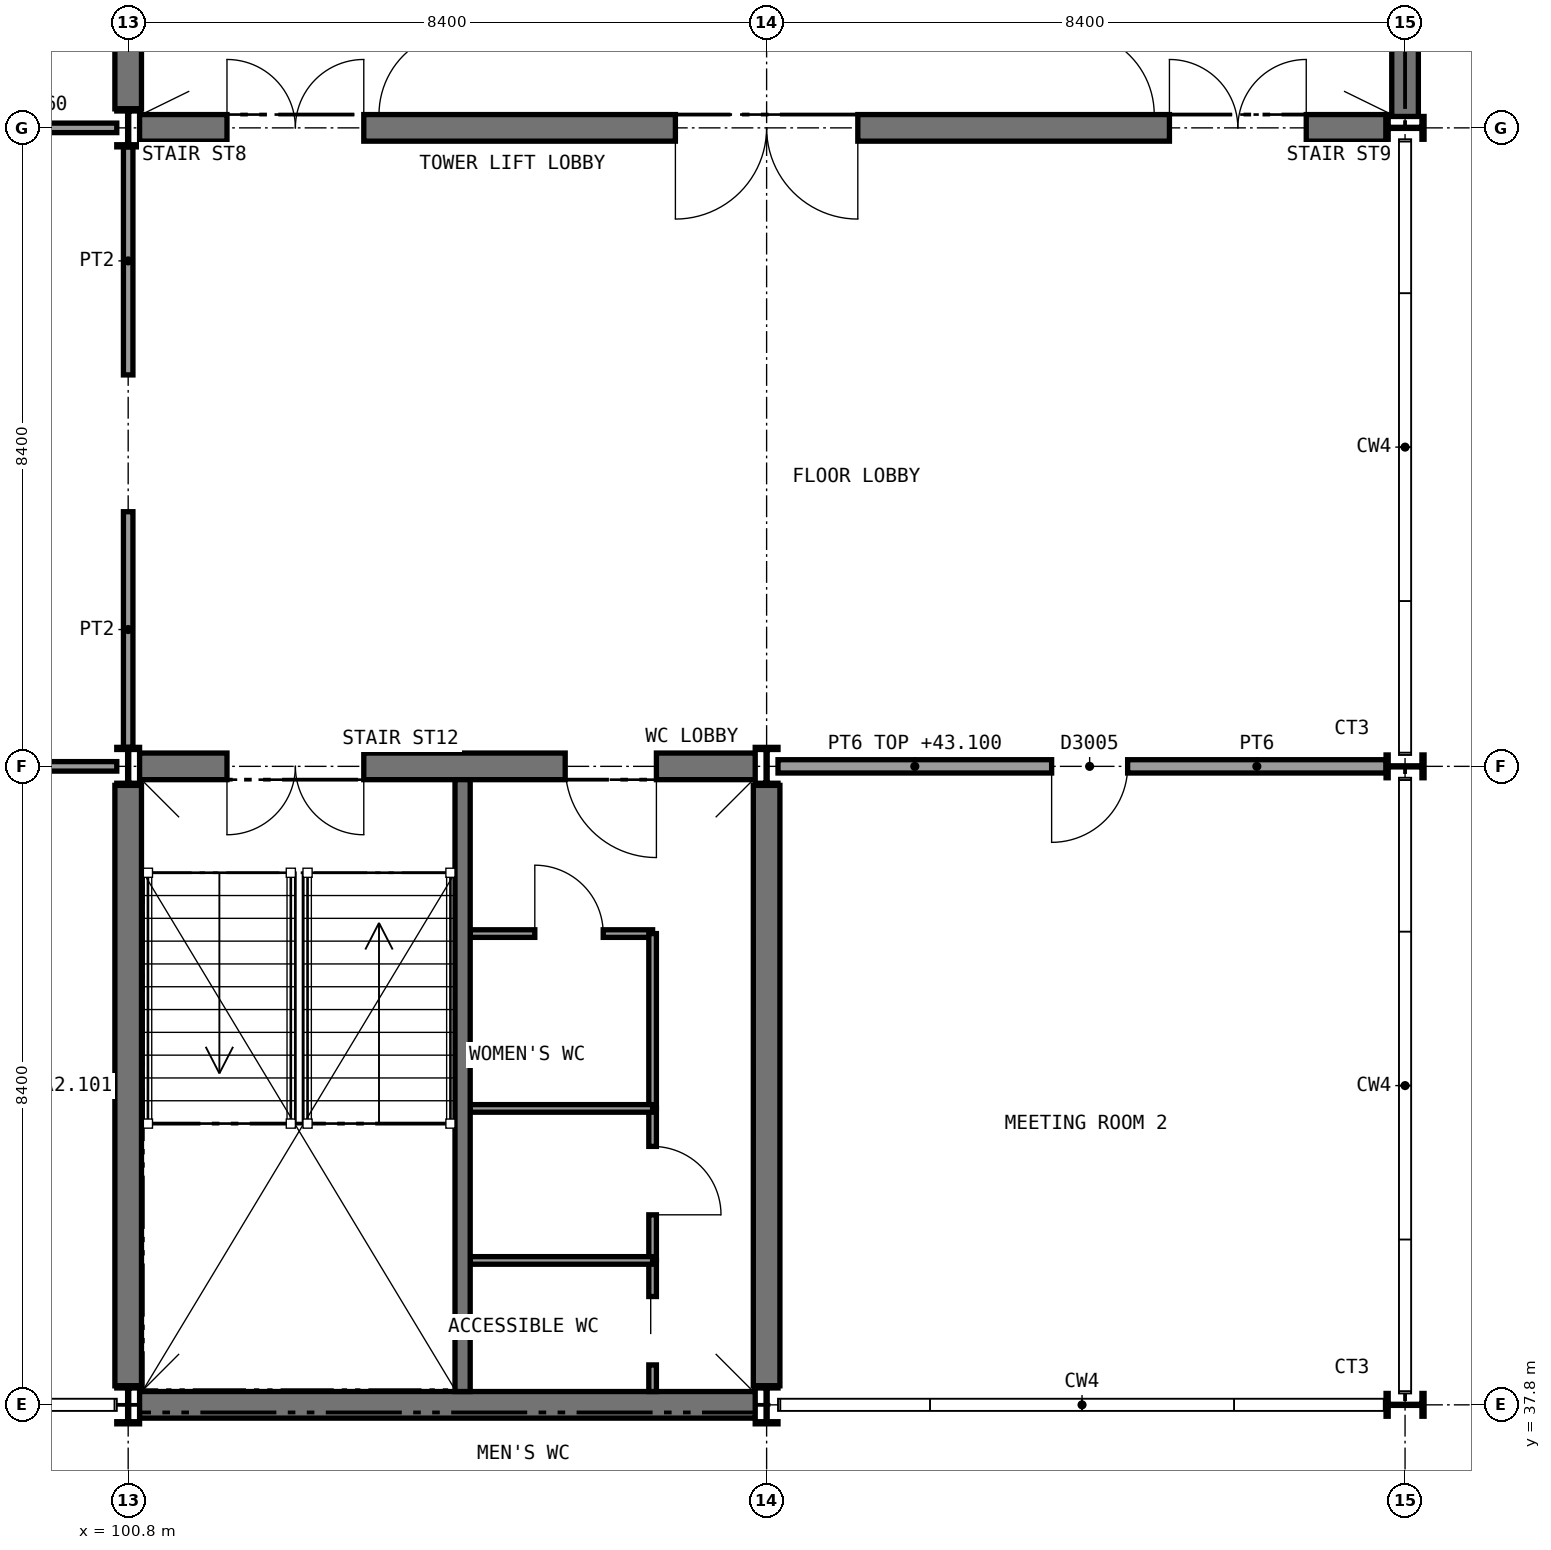
"""IFC4 building model, lengths in metres.
Left out: names, types, materials, properties, quantities, classifications, styles, units other than length and angle.
Written with IfcOpenShell. Run it as: python <this file> out.ifc"""

import sys

from ifc_helpers import new_model, si_unit, direction, frame, frame_2d, origin, origin_2d, place, context, subcontext, project, spatial, rectangle, i_section, extrude, element, fill, save


model = new_model("IFC4")
c1 = context("Model", 3, precision=1e-05, world=origin(), true_north=direction((0.0, 1.0)))
c2 = subcontext(c1, "Body", "Model", "MODEL_VIEW")
j1 = project(units=[si_unit("LENGTHUNIT", "METRE"), si_unit("PLANEANGLEUNIT", "RADIAN")], contexts=[c1])
p1 = place(None, origin())
s1 = spatial("IfcSite", under=j1, at=p1, CompositionType="ELEMENT")
p2 = place(p1, origin())
s2 = spatial("IfcBuilding", under=s1, at=p2, CompositionType="ELEMENT")
p3 = place(p2, frame((0.0, 0.0, 39.6)))
s3 = spatial("IfcBuildingStorey", under=s2, at=p3, CompositionType="ELEMENT", Elevation=39.6)
p4 = place(p3, frame((100.95, 54.6, 0.0), z_axis=(0.0, 0.0, 1.0), x_axis=(1.0, 0.0, 0.0)))
e1 = element("IfcWall", 1, at=p4, inside=s3, PredefinedType="SHEAR", context=c2, shape_type="SweptSolid", body=[
    extrude(rectangle(XDim=16.4, YDim=0.35, at=frame_2d((8.2, 0.0))), origin(), (0.0, 0.0, 1.0), 3.85),
])
p5 = place(p4, frame((1.15, 0.0, 0.0)))
e2 = element("IfcOpeningElement", 2, at=p5, cuts=e1, PredefinedType="OPENING", context=c2, shape_type="SweptSolid", body=[
    extrude(rectangle(XDim=1.8, YDim=2.1, at=frame_2d((0.9, 1.05))), frame((0.0, 0.185, 0.0), z_axis=(0.0, -1.0, 0.0), x_axis=(1.0, 0.0, 0.0)), (0.0, 0.0, 1.0), 0.37),
])
p6 = place(p4, frame((13.55, 0.0, 0.0)))
e3 = element("IfcOpeningElement", 3, at=p6, cuts=e1, PredefinedType="OPENING", context=c2, shape_type="SweptSolid", body=[
    extrude(rectangle(XDim=1.8, YDim=2.1, at=frame_2d((0.9, 1.05))), frame((0.0, 0.185, 0.0), z_axis=(0.0, -1.0, 0.0), x_axis=(1.0, 0.0, 0.0)), (0.0, 0.0, 1.0), 0.37),
])
p7 = place(p4, frame((7.05, 0.0, 0.0)))
e4 = element("IfcOpeningElement", 4, at=p7, cuts=e1, PredefinedType="OPENING", context=c2, shape_type="SweptSolid", body=[
    extrude(rectangle(XDim=2.4, YDim=2.4, at=frame_2d((1.2, 1.2))), frame((0.0, 0.185, 0.0), z_axis=(0.0, -1.0, 0.0), x_axis=(1.0, 0.0, 0.0)), (0.0, 0.0, 1.0), 0.37),
])
p8 = place(p3, frame((100.8, 54.85, 0.0), z_axis=(0.0, 0.0, 1.0), x_axis=(0.0, 1.0, 0.0)))
e5 = element("IfcWall", 5, at=p8, inside=s3, PredefinedType="SHEAR", context=c2, shape_type="SweptSolid", body=[
    extrude(rectangle(XDim=7.9, YDim=0.35, at=frame_2d((3.95, 0.0))), origin(), (0.0, 0.0, 1.0), 3.85),
])
for number, where, z_axis, x_axis in (
    (6, (117.6, 54.75, 0.0), (0.0, 0.0, 1.0), (0.0, 1.0, 0.0)),
    (7, (100.95, 37.8, 0.0), (0.0, 0.0, 1.0), (1.0, 0.0, 0.0)),
):
    element("IfcWall", number, at=place(p3, frame(where, z_axis=z_axis, x_axis=x_axis)), inside=s3, PredefinedType="SHEAR", context=c2, shape_type="SweptSolid", body=[
        extrude(rectangle(XDim=8.1, YDim=0.35, at=frame_2d((4.05, 0.0))), origin(), (0.0, 0.0, 1.0), 3.85),
    ])
p9 = place(p3, frame((100.95, 46.2, 0.0), z_axis=(0.0, 0.0, 1.0), x_axis=(1.0, 0.0, 0.0)))
e8 = element("IfcWall", 8, at=p9, inside=s3, PredefinedType="SHEAR", context=c2, shape_type="SweptSolid", body=[
    extrude(rectangle(XDim=8.1, YDim=0.35, at=frame_2d((4.05, 0.0))), origin(), (0.0, 0.0, 1.0), 3.85),
])
p10 = place(p9, frame((1.15, 0.0, 0.0)))
e9 = element("IfcOpeningElement", 9, at=p10, cuts=e8, PredefinedType="OPENING", context=c2, shape_type="SweptSolid", body=[
    extrude(rectangle(XDim=1.8, YDim=2.1, at=frame_2d((0.9, 1.05))), frame((0.0, 0.185, 0.0), z_axis=(0.0, -1.0, 0.0), x_axis=(1.0, 0.0, 0.0)), (0.0, 0.0, 1.0), 0.37),
])
p11 = place(p9, frame((5.6, 0.0, 0.0)))
e10 = element("IfcOpeningElement", 10, at=p11, cuts=e8, PredefinedType="OPENING", context=c2, shape_type="SweptSolid", body=[
    extrude(rectangle(XDim=1.2, YDim=2.1, at=frame_2d((0.6, 1.05))), frame((0.0, 0.185, 0.0), z_axis=(0.0, -1.0, 0.0), x_axis=(1.0, 0.0, 0.0)), (0.0, 0.0, 1.0), 0.37),
])
for number, where, z_axis, x_axis in (
    (11, (100.8, 38.05, 0.0), (0.0, 0.0, 1.0), (0.0, 1.0, 0.0)),
    (12, (109.2, 38.05, 0.0), (0.0, 0.0, 1.0), (0.0, 1.0, 0.0)),
):
    element("IfcWall", number, at=place(p3, frame(where, z_axis=z_axis, x_axis=x_axis)), inside=s3, PredefinedType="SHEAR", context=c2, shape_type="SweptSolid", body=[
        extrude(rectangle(XDim=7.9, YDim=0.35, at=frame_2d((3.95, 0.0))), origin(), (0.0, 0.0, 1.0), 3.85),
    ])
for number, where, z_axis, x_axis in (
    (13, (100.8, 37.8, 0.0), (0.0, 0.0, 1.0), (1.0, 0.0, 0.0)),
    (14, (100.8, 46.2, 0.0), (0.0, 0.0, 1.0), (1.0, 0.0, 0.0)),
    (15, (100.8, 54.6, 0.0), (0.0, 0.0, 1.0), (1.0, 0.0, 0.0)),
    (16, (109.2, 37.8, 0.0), (0.0, 0.0, 1.0), (1.0, 0.0, 0.0)),
    (17, (109.2, 46.2, 0.0), (0.0, 0.0, 1.0), (1.0, 0.0, 0.0)),
    (18, (117.6, 37.8, 0.0), (0.0, 0.0, 1.0), (0.0, 1.0, 0.0)),
    (19, (117.6, 46.2, 0.0), (0.0, 0.0, 1.0), (0.0, 1.0, 0.0)),
    (20, (117.6, 54.6, 0.0), (0.0, 0.0, 1.0), (0.0, 1.0, 0.0)),
):
    element("IfcColumn", number, at=place(p3, frame(where, z_axis=z_axis, x_axis=x_axis)), inside=s3, PredefinedType="COLUMN", context=c2, shape_type="SweptSolid", body=[
        extrude(i_section(OverallWidth=0.3, OverallDepth=0.5, WebThickness=0.014, FlangeThickness=0.028, FilletRadius=0.027, at=origin_2d()), origin(), (0.0, 0.0, 1.0), 4.0),
    ])
p12 = place(p3, frame((105.3, 44.0, 0.0), z_axis=(0.0, 0.0, 1.0), x_axis=(1.0, 0.0, 0.0)))
e21 = element("IfcWall", 21, at=p12, inside=s3, PredefinedType="PARTITIONING", context=c2, shape_type="SweptSolid", body=[
    extrude(rectangle(XDim=2.4, YDim=0.1, at=frame_2d((1.2, 0.0))), origin(), (0.0, 0.0, 1.0), 3.78),
])
p13 = place(p12, frame((0.85, 0.0, 0.0)))
e22 = element("IfcOpeningElement", 22, at=p13, cuts=e21, PredefinedType="OPENING", context=c2, shape_type="SweptSolid", body=[
    extrude(rectangle(XDim=0.9, YDim=2.1, at=frame_2d((0.45, 1.05))), frame((0.0, 0.06, 0.0), z_axis=(0.0, -1.0, 0.0), x_axis=(1.0, 0.0, 0.0)), (0.0, 0.0, 1.0), 0.12),
])
p14 = place(p3, frame((107.7, 41.7, 0.0), z_axis=(0.0, 0.0, 1.0), x_axis=(0.0, 1.0, 0.0)))
e23 = element("IfcWall", 23, at=p14, inside=s3, PredefinedType="PARTITIONING", context=c2, shape_type="SweptSolid", body=[
    extrude(rectangle(XDim=2.3, YDim=0.1, at=frame_2d((1.15, 0.0))), origin(), (0.0, 0.0, 1.0), 3.78),
])
p15 = place(p3, frame((107.7, 39.7, 0.0), z_axis=(0.0, 0.0, 1.0), x_axis=(0.0, 1.0, 0.0)))
e24 = element("IfcWall", 24, at=p15, inside=s3, PredefinedType="PARTITIONING", context=c2, shape_type="SweptSolid", body=[
    extrude(rectangle(XDim=2.0, YDim=0.1, at=frame_2d((1.0, 0.0))), origin(), (0.0, 0.0, 1.0), 3.78),
])
p16 = place(p15, frame((0.6, 0.0, 0.0)))
e25 = element("IfcOpeningElement", 25, at=p16, cuts=e24, PredefinedType="OPENING", context=c2, shape_type="SweptSolid", body=[
    extrude(rectangle(XDim=0.9, YDim=2.1, at=frame_2d((0.45, 1.05))), frame((0.0, 0.06, 0.0), z_axis=(0.0, -1.0, 0.0), x_axis=(1.0, 0.0, 0.0)), (0.0, 0.0, 1.0), 0.12),
])
p17 = place(p3, frame((107.7, 37.975, 0.0), z_axis=(0.0, 0.0, 1.0), x_axis=(0.0, 1.0, 0.0)))
e26 = element("IfcWall", 26, at=p17, inside=s3, PredefinedType="PARTITIONING", context=c2, shape_type="SweptSolid", body=[
    extrude(rectangle(XDim=1.725, YDim=0.1, at=frame_2d((0.862, 0.0))), origin(), (0.0, 0.0, 1.0), 3.78),
])
p18 = place(p17, frame((0.35, 0.0, 0.0)))
e27 = element("IfcOpeningElement", 27, at=p18, cuts=e26, PredefinedType="OPENING", context=c2, shape_type="SweptSolid", body=[
    extrude(rectangle(XDim=0.9, YDim=2.1, at=frame_2d((0.45, 1.05))), frame((0.0, 0.06, 0.0), z_axis=(0.0, -1.0, 0.0), x_axis=(1.0, 0.0, 0.0)), (0.0, 0.0, 1.0), 0.12),
])
for number, where, z_axis, x_axis in (
    (28, (105.3, 41.7, 0.0), (0.0, 0.0, 1.0), (1.0, 0.0, 0.0)),
    (29, (105.3, 39.7, 0.0), (0.0, 0.0, 1.0), (1.0, 0.0, 0.0)),
):
    element("IfcWall", number, at=place(p3, frame(where, z_axis=z_axis, x_axis=x_axis)), inside=s3, PredefinedType="PARTITIONING", context=c2, shape_type="SweptSolid", body=[
        extrude(rectangle(XDim=2.4, YDim=0.1, at=frame_2d((1.2, 0.0))), origin(), (0.0, 0.0, 1.0), 3.78),
    ])
p19 = place(p3, frame((92.55, 46.2, 0.0), z_axis=(0.0, 0.0, 1.0), x_axis=(1.0, 0.0, 0.0)))
e30 = element("IfcWall", 30, at=p19, inside=s3, PredefinedType="PARTITIONING", context=c2, shape_type="SweptSolid", body=[
    extrude(rectangle(XDim=8.1, YDim=0.125, at=frame_2d((4.05, 0.0))), origin(), (0.0, 0.0, 1.0), 3.5),
])
p20 = place(p19, frame((3.1, 0.0, 0.0)))
e31 = element("IfcOpeningElement", 31, at=p20, cuts=e30, PredefinedType="OPENING", context=c2, shape_type="SweptSolid", body=[
    extrude(rectangle(XDim=1.8, YDim=2.1, at=frame_2d((0.9, 1.05))), frame((0.0, 0.073, 0.0), z_axis=(0.0, -1.0, 0.0), x_axis=(1.0, 0.0, 0.0)), (0.0, 0.0, 1.0), 0.145),
])
p21 = place(p3, frame((109.35, 46.2, 0.0), z_axis=(0.0, 0.0, 1.0), x_axis=(1.0, 0.0, 0.0)))
e32 = element("IfcWall", 32, at=p21, inside=s3, PredefinedType="PARTITIONING", context=c2, shape_type="SweptSolid", body=[
    extrude(rectangle(XDim=8.0, YDim=0.175, at=frame_2d((4.0, 0.0))), origin(), (0.0, 0.0, 1.0), 3.5),
])
p22 = place(p21, frame((3.6, 0.0, 0.0)))
e33 = element("IfcOpeningElement", 33, at=p22, cuts=e32, PredefinedType="OPENING", context=c2, shape_type="SweptSolid", body=[
    extrude(rectangle(XDim=1.0, YDim=2.1, at=frame_2d((0.5, 1.05))), frame((0.0, 0.098, 0.0), z_axis=(0.0, -1.0, 0.0), x_axis=(1.0, 0.0, 0.0)), (0.0, 0.0, 1.0), 0.195),
])
p23 = place(p3, frame((100.8, 46.45, 0.0), z_axis=(0.0, 0.0, 1.0), x_axis=(0.0, 1.0, 0.0)))
e34 = element("IfcWall", 34, at=p23, inside=s3, PredefinedType="PARTITIONING", context=c2, shape_type="SweptSolid", body=[
    extrude(rectangle(XDim=3.1, YDim=0.125, at=frame_2d((1.55, 0.0))), origin(), (0.0, 0.0, 1.0), 3.5),
])
p24 = place(p3, frame((100.8, 51.35, 0.0), z_axis=(0.0, 0.0, 1.0), x_axis=(0.0, 1.0, 0.0)))
e35 = element("IfcWall", 35, at=p24, inside=s3, PredefinedType="PARTITIONING", context=c2, shape_type="SweptSolid", body=[
    extrude(rectangle(XDim=3.0, YDim=0.125, at=frame_2d((1.5, 0.0))), origin(), (0.0, 0.0, 1.0), 3.5),
])
p25 = place(p3, frame((92.55, 54.6, 0.0), z_axis=(0.0, 0.0, 1.0), x_axis=(1.0, 0.0, 0.0)))
e36 = element("IfcWall", 36, at=p25, inside=s3, PredefinedType="PARTITIONING", context=c2, shape_type="SweptSolid", body=[
    extrude(rectangle(XDim=8.1, YDim=0.125, at=frame_2d((4.05, 0.0))), origin(), (0.0, 0.0, 1.0), 3.56),
])
p26 = place(p25, frame((3.6, 0.0, 0.0)))
e37 = element("IfcOpeningElement", 37, at=p26, cuts=e36, PredefinedType="OPENING", context=c2, shape_type="SweptSolid", body=[
    extrude(rectangle(XDim=0.9, YDim=2.1, at=frame_2d((0.45, 1.05))), frame((0.0, 0.073, 0.0), z_axis=(0.0, -1.0, 0.0), x_axis=(1.0, 0.0, 0.0)), (0.0, 0.0, 1.0), 0.145),
])
p27 = place(p3, frame((105.2, 62.825, 0.0), z_axis=(0.0, 0.0, 1.0), x_axis=(0.0, -1.0, 0.0)))
e38 = element("IfcWall", 38, at=p27, inside=s3, PredefinedType="SHEAR", context=c2, shape_type="SweptSolid", body=[
    extrude(rectangle(XDim=8.05, YDim=0.2, at=frame_2d((4.025, 0.0))), origin(), (0.0, 0.0, 1.0), 3.85),
])
p28 = place(p27, frame((6.95, 0.0, 0.0)))
e39 = element("IfcOpeningElement", 39, at=p28, cuts=e38, PredefinedType="OPENING", context=c2, shape_type="SweptSolid", body=[
    extrude(rectangle(XDim=1.11, YDim=2.1, at=frame_2d((0.555, 1.05))), frame((0.0, 0.11, 0.0), z_axis=(0.0, -1.0, 0.0), x_axis=(1.0, 0.0, 0.0)), (0.0, 0.0, 1.0), 0.22),
])
p29 = place(p3, frame((113.2, 62.825, 0.0), z_axis=(0.0, 0.0, 1.0), x_axis=(0.0, -1.0, 0.0)))
e40 = element("IfcWall", 40, at=p29, inside=s3, PredefinedType="SHEAR", context=c2, shape_type="SweptSolid", body=[
    extrude(rectangle(XDim=8.05, YDim=0.2, at=frame_2d((4.025, 0.0))), origin(), (0.0, 0.0, 1.0), 3.85),
])
p30 = place(p29, frame((6.95, 0.0, 0.0)))
e41 = element("IfcOpeningElement", 41, at=p30, cuts=e40, PredefinedType="OPENING", context=c2, shape_type="SweptSolid", body=[
    extrude(rectangle(XDim=1.11, YDim=2.1, at=frame_2d((0.555, 1.05))), frame((0.0, 0.11, 0.0), z_axis=(0.0, -1.0, 0.0), x_axis=(1.0, 0.0, 0.0)), (0.0, 0.0, 1.0), 0.22),
])
p31 = place(p3, frame((105.2, 37.975, 0.0), z_axis=(0.0, 0.0, 1.0), x_axis=(0.0, 1.0, 0.0)))
e42 = element("IfcWall", 42, at=p31, inside=s3, PredefinedType="SHEAR", context=c2, shape_type="SweptSolid", body=[
    extrude(rectangle(XDim=8.05, YDim=0.2, at=frame_2d((4.025, 0.0))), origin(), (0.0, 0.0, 1.0), 3.85),
])
p32 = place(p13, origin())
e43 = element("IfcDoor", 43, at=p32, inside=s3, OperationType="SINGLE_SWING_LEFT", PredefinedType="DOOR", context=c2, shape_type="SweptSolid", body=[
    extrude(rectangle(XDim=0.9, YDim=2.1, at=frame_2d((0.45, 1.05))), frame((0.0, 0.025, 0.0), z_axis=(0.0, -1.0, 0.0), x_axis=(1.0, 0.0, 0.0)), (0.0, 0.0, 1.0), 0.05),
])
fill(e22, e43)
p33 = place(p16, frame((0.9, 0.0, 0.0), z_axis=(0.0, 0.0, 1.0), x_axis=(-1.0, 0.0, 0.0)))
e44 = element("IfcDoor", 44, at=p33, inside=s3, OperationType="SINGLE_SWING_RIGHT", PredefinedType="DOOR", context=c2, shape_type="SweptSolid", body=[
    extrude(rectangle(XDim=0.9, YDim=2.1, at=frame_2d((0.45, 1.05))), frame((0.0, 0.025, 0.0), z_axis=(0.0, -1.0, 0.0), x_axis=(1.0, 0.0, 0.0)), (0.0, 0.0, 1.0), 0.05),
])
fill(e25, e44)
p34 = place(p18, origin())
e45 = element("IfcDoor", 45, at=p34, inside=s3, OperationType="SLIDING_TO_RIGHT", PredefinedType="DOOR", context=c2, shape_type="SweptSolid", body=[
    extrude(rectangle(XDim=0.9, YDim=2.1, at=frame_2d((0.45, 1.05))), frame((0.0, 0.025, 0.0), z_axis=(0.0, -1.0, 0.0), x_axis=(1.0, 0.0, 0.0)), (0.0, 0.0, 1.0), 0.05),
])
fill(e27, e45)
p35 = place(p22, frame((1.0, 0.0, 0.0), z_axis=(0.0, 0.0, 1.0), x_axis=(-1.0, 0.0, 0.0)))
e46 = element("IfcDoor", 46, at=p35, inside=s3, OperationType="SINGLE_SWING_RIGHT", PredefinedType="DOOR", context=c2, shape_type="SweptSolid", body=[
    extrude(rectangle(XDim=1.0, YDim=2.1, at=frame_2d((0.5, 1.05))), frame((0.0, 0.025, 0.0), z_axis=(0.0, -1.0, 0.0), x_axis=(1.0, 0.0, 0.0)), (0.0, 0.0, 1.0), 0.05),
])
fill(e33, e46)
p36 = place(p28, frame((1.1, 0.0, 0.0), z_axis=(0.0, 0.0, 1.0), x_axis=(-1.0, 0.0, 0.0)))
e47 = element("IfcDoor", 47, at=p36, inside=s3, OperationType="SINGLE_SWING_LEFT", PredefinedType="DOOR", context=c2, shape_type="SweptSolid", body=[
    extrude(rectangle(XDim=1.1, YDim=2.1, at=frame_2d((0.55, 1.05))), frame((0.0, 0.025, 0.0), z_axis=(0.0, -1.0, 0.0), x_axis=(1.0, 0.0, 0.0)), (0.0, 0.0, 1.0), 0.05),
])
fill(e39, e47)
p37 = place(p30, origin())
e48 = element("IfcDoor", 48, at=p37, inside=s3, OperationType="SINGLE_SWING_RIGHT", PredefinedType="DOOR", context=c2, shape_type="SweptSolid", body=[
    extrude(rectangle(XDim=1.1, YDim=2.1, at=frame_2d((0.55, 1.05))), frame((0.0, 0.025, 0.0), z_axis=(0.0, -1.0, 0.0), x_axis=(1.0, 0.0, 0.0)), (0.0, 0.0, 1.0), 0.05),
])
fill(e41, e48)
p38 = place(p5, origin())
e49 = element("IfcDoor", 49, at=p38, inside=s3, OperationType="DOUBLE_DOOR_SINGLE_SWING", PredefinedType="DOOR", context=c2, shape_type="SweptSolid", body=[
    extrude(rectangle(XDim=1.8, YDim=2.1, at=frame_2d((0.9, 1.05))), frame((0.0, 0.025, 0.0), z_axis=(0.0, -1.0, 0.0), x_axis=(1.0, 0.0, 0.0)), (0.0, 0.0, 1.0), 0.05),
])
fill(e2, e49)
p39 = place(p6, origin())
e50 = element("IfcDoor", 50, at=p39, inside=s3, OperationType="DOUBLE_DOOR_SINGLE_SWING", PredefinedType="DOOR", context=c2, shape_type="SweptSolid", body=[
    extrude(rectangle(XDim=1.8, YDim=2.1, at=frame_2d((0.9, 1.05))), frame((0.0, 0.025, 0.0), z_axis=(0.0, -1.0, 0.0), x_axis=(1.0, 0.0, 0.0)), (0.0, 0.0, 1.0), 0.05),
])
fill(e3, e50)
p40 = place(p7, frame((2.4, 0.0, 0.0), z_axis=(0.0, 0.0, 1.0), x_axis=(-1.0, 0.0, 0.0)))
e51 = element("IfcDoor", 51, at=p40, inside=s3, OperationType="DOUBLE_DOOR_SINGLE_SWING", PredefinedType="DOOR", context=c2, shape_type="SweptSolid", body=[
    extrude(rectangle(XDim=2.4, YDim=2.4, at=frame_2d((1.2, 1.2))), frame((0.0, 0.025, 0.0), z_axis=(0.0, -1.0, 0.0), x_axis=(1.0, 0.0, 0.0)), (0.0, 0.0, 1.0), 0.05),
])
fill(e4, e51)
p41 = place(p10, frame((1.8, 0.0, 0.0), z_axis=(0.0, 0.0, 1.0), x_axis=(-1.0, 0.0, 0.0)))
e52 = element("IfcDoor", 52, at=p41, inside=s3, OperationType="DOUBLE_DOOR_SINGLE_SWING", PredefinedType="DOOR", context=c2, shape_type="SweptSolid", body=[
    extrude(rectangle(XDim=1.8, YDim=2.1, at=frame_2d((0.9, 1.05))), frame((0.0, 0.025, 0.0), z_axis=(0.0, -1.0, 0.0), x_axis=(1.0, 0.0, 0.0)), (0.0, 0.0, 1.0), 0.05),
])
fill(e9, e52)
p42 = place(p11, frame((1.2, 0.0, 0.0), z_axis=(0.0, 0.0, 1.0), x_axis=(-1.0, 0.0, 0.0)))
e53 = element("IfcDoor", 53, at=p42, inside=s3, OperationType="SINGLE_SWING_LEFT", PredefinedType="DOOR", context=c2, shape_type="SweptSolid", body=[
    extrude(rectangle(XDim=1.2, YDim=2.1, at=frame_2d((0.6, 1.05))), frame((0.0, 0.025, 0.0), z_axis=(0.0, -1.0, 0.0), x_axis=(1.0, 0.0, 0.0)), (0.0, 0.0, 1.0), 0.05),
])
fill(e10, e53)
save(model, sys.argv[1])
